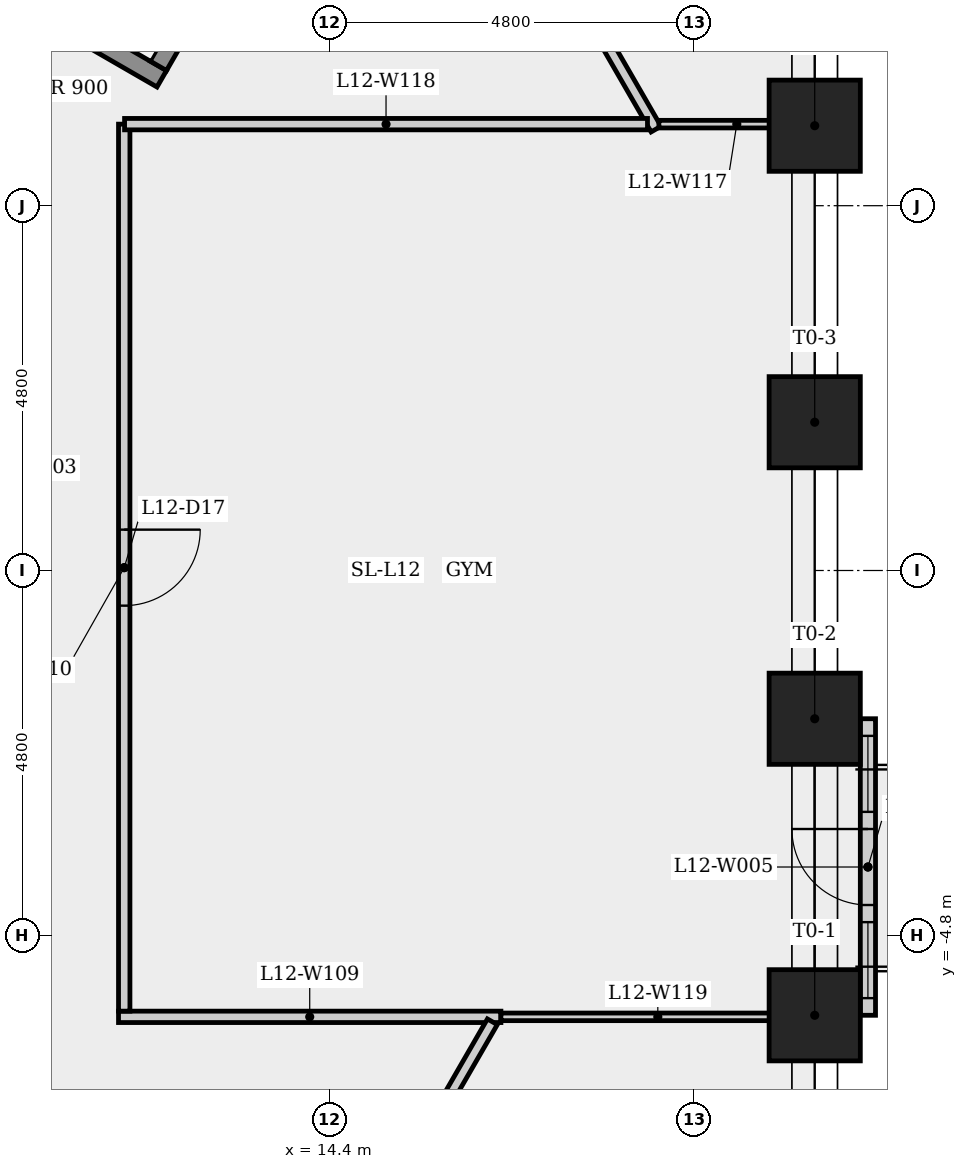
"""IFC4 building model, lengths in metres.
Left out: names, types, materials, properties, quantities, classifications, styles, units other than length and angle.
Written with IfcOpenShell. Run it as: python <this file> out.ifc"""

import sys

from ifc_helpers import new_model, si_unit, direction, frame, frame_2d, origin, origin_2d, place, context, subcontext, project, spatial, rectangle, extrude, element, fill, save


model = new_model("IFC4")
c1 = context("Model", 3, precision=1e-05, world=origin(), true_north=direction((0.0, 1.0)))
c2 = subcontext(c1, "Body", "Model", "MODEL_VIEW")
j1 = project(units=[si_unit("LENGTHUNIT", "METRE"), si_unit("PLANEANGLEUNIT", "RADIAN")], contexts=[c1])
p1 = place(None, origin())
s1 = spatial("IfcSite", under=j1, at=p1, CompositionType="ELEMENT")
p2 = place(p1, origin())
s2 = spatial("IfcBuilding", under=s1, at=p2, CompositionType="ELEMENT")
p3 = place(p2, frame((0.0, 0.0, 49.3)))
s3 = spatial("IfcBuildingStorey", under=s2, at=p3, CompositionType="ELEMENT", Elevation=49.3)
for number, where, z_axis, x_axis in (
    (1, (20.785, -5.852, 0.0), (0.0, 0.0, 1.0), (1.0, 0.0, 0.0)),
    (2, (20.785, -1.951, 0.0), (0.0, 0.0, 1.0), (1.0, 0.0, 0.0)),
    (3, (20.785, 1.951, 0.0), (0.0, 0.0, 1.0), (1.0, 0.0, 0.0)),
    (4, (20.785, 5.852, 0.0), (0.0, 0.0, 1.0), (1.0, 0.0, 0.0)),
):
    element("IfcColumn", number, at=place(p3, frame(where, z_axis=z_axis, x_axis=x_axis)), inside=s3, PredefinedType="COLUMN", context=c2, shape_type="SweptSolid", body=[
        extrude(rectangle(XDim=1.2, YDim=1.2, at=origin_2d()), origin(), (0.0, 0.0, 1.0), 3.4),
    ])
p4 = place(p3, frame((21.485, -5.852, 0.0), z_axis=(0.0, 0.0, 1.0), x_axis=(0.0, 1.0, 0.0)))
e5 = element("IfcWall", 5, at=p4, inside=s3, PredefinedType="SOLIDWALL", context=c2, shape_type="SweptSolid", body=[
    extrude(rectangle(XDim=3.902, YDim=0.2, at=frame_2d((1.951, 0.0))), origin(), (0.0, 0.0, 1.0), 3.4),
])
p5 = place(p4, frame((1.451, 0.0, 0.0)))
e6 = element("IfcOpeningElement", 6, at=p5, cuts=e5, PredefinedType="OPENING", context=c2, shape_type="SweptSolid", body=[
    extrude(rectangle(XDim=1.0, YDim=2.4, at=frame_2d((0.5, 1.2))), frame((0.0, 0.11, 0.0), z_axis=(0.0, -1.0, 0.0), x_axis=(1.0, 0.0, 0.0)), (0.0, 0.0, 1.0), 0.22),
])
p6 = place(p4, frame((0.226, 0.0, 0.9)))
e7 = element("IfcOpeningElement", 7, at=p6, cuts=e5, PredefinedType="OPENING", context=c2, shape_type="SweptSolid", body=[
    extrude(rectangle(XDim=1.0, YDim=1.5, at=frame_2d((0.5, 0.75))), frame((0.0, 0.11, 0.0), z_axis=(0.0, -1.0, 0.0), x_axis=(1.0, 0.0, 0.0)), (0.0, 0.0, 1.0), 0.22),
])
p7 = place(p4, frame((2.677, 0.0, 0.9)))
e8 = element("IfcOpeningElement", 8, at=p7, cuts=e5, PredefinedType="OPENING", context=c2, shape_type="SweptSolid", body=[
    extrude(rectangle(XDim=1.0, YDim=1.5, at=frame_2d((0.5, 0.75))), frame((0.0, 0.11, 0.0), z_axis=(0.0, -1.0, 0.0), x_axis=(1.0, 0.0, 0.0)), (0.0, 0.0, 1.0), 0.22),
])
p8 = place(p3, frame((11.625, -5.873, 0.0), z_axis=(0.0, 0.0, 1.0), x_axis=(1.0, 0.0, 0.0)))
e9 = element("IfcWall", 9, at=p8, inside=s3, PredefinedType="PARTITIONING", context=c2, shape_type="SweptSolid", body=[
    extrude(rectangle(XDim=5.031, YDim=0.15, at=frame_2d((2.516, 0.0))), origin(), (0.0, 0.0, 1.0), 3.05),
])
p9 = place(p3, frame((11.7, 5.873, 0.0), z_axis=(0.0, 0.0, 1.0), x_axis=(0.0, -1.0, 0.0)))
e10 = element("IfcWall", 10, at=p9, inside=s3, PredefinedType="PARTITIONING", context=c2, shape_type="SweptSolid", body=[
    extrude(rectangle(XDim=11.671, YDim=0.15, at=frame_2d((5.835, 0.0))), origin(), (0.0, 0.0, 1.0), 3.05),
])
p10 = place(p9, frame((5.336, 0.0, 0.0)))
e11 = element("IfcOpeningElement", 11, at=p10, cuts=e10, PredefinedType="OPENING", context=c2, shape_type="SweptSolid", body=[
    extrude(rectangle(XDim=1.0, YDim=2.1, at=frame_2d((0.5, 1.05))), frame((0.0, 0.085, 0.0), z_axis=(0.0, -1.0, 0.0), x_axis=(1.0, 0.0, 0.0)), (0.0, 0.0, 1.0), 0.17),
])
p11 = place(p3, frame((12.194, 6.47, 0.0), z_axis=(0.0, 0.0, 1.0), x_axis=(-0.866025499775, 0.499999833739, 0.0)))
e12 = element("IfcWall", 12, at=p11, inside=s3, PredefinedType="SHEAR", context=c2, shape_type="SweptSolid", body=[
    extrude(rectangle(XDim=6.4, YDim=0.25, at=frame_2d((3.2, 0.0))), origin(), (0.0, 0.0, 1.0), 3.05),
])
p12 = place(p11, frame((5.25, 0.0, 0.0)))
e13 = element("IfcOpeningElement", 13, at=p12, cuts=e12, PredefinedType="OPENING", context=c2, shape_type="SweptSolid", body=[
    extrude(rectangle(XDim=1.0, YDim=2.1, at=frame_2d((0.5, 1.05))), frame((0.0, 0.135, 0.0), z_axis=(0.0, -1.0, 0.0), x_axis=(1.0, 0.0, 0.0)), (0.0, 0.0, 1.0), 0.27),
])
p13 = place(p3, frame((13.523, 9.022, 0.0), z_axis=(0.0, 0.0, 1.0), x_axis=(-0.500034990121, -0.866005201286, 0.0)))
e14 = element("IfcWall", 14, at=p13, inside=s3, PredefinedType="SHEAR", context=c2, shape_type="SweptSolid", body=[
    extrude(rectangle(XDim=2.75, YDim=0.25, at=frame_2d((1.375, 0.0))), origin(), (0.0, 0.0, 1.0), 3.05),
])
p14 = place(p3, frame((15.219, 11.831, 0.0), z_axis=(0.0, 0.0, 1.0), x_axis=(0.50002024234, -0.866013716549, 0.0)))
e15 = element("IfcWall", 15, at=p14, inside=s3, PredefinedType="PARTITIONING", context=c2, shape_type="SweptSolid", body=[
    extrude(rectangle(XDim=6.955, YDim=0.15, at=frame_2d((3.478, 0.0))), origin(), (0.0, 0.0, 1.0), 3.05),
])
p15 = place(p14, frame((2.923, 0.0, 0.0)))
e16 = element("IfcOpeningElement", 16, at=p15, cuts=e15, PredefinedType="OPENING", context=c2, shape_type="SweptSolid", body=[
    extrude(rectangle(XDim=1.0, YDim=2.1, at=frame_2d((0.5, 1.05))), frame((0.0, 0.085, 0.0), z_axis=(0.0, -1.0, 0.0), x_axis=(1.0, 0.0, 0.0)), (0.0, 0.0, 1.0), 0.17),
])
p16 = place(p3, frame((16.543, -5.938, 0.0), z_axis=(0.0, 0.0, 1.0), x_axis=(-0.500005424275, -0.866022272055, 0.0)))
e17 = element("IfcWall", 17, at=p16, inside=s3, PredefinedType="PARTITIONING", context=c2, shape_type="SweptSolid", body=[
    extrude(rectangle(XDim=8.19, YDim=0.15, at=frame_2d((4.095, 0.0))), origin(), (0.0, 0.0, 1.0), 3.05),
])
p17 = place(p16, frame((3.595, 0.0, 0.0)))
e18 = element("IfcOpeningElement", 18, at=p17, cuts=e17, PredefinedType="OPENING", context=c2, shape_type="SweptSolid", body=[
    extrude(rectangle(XDim=1.0, YDim=2.1, at=frame_2d((0.5, 1.05))), frame((0.0, 0.085, 0.0), z_axis=(0.0, -1.0, 0.0), x_axis=(1.0, 0.0, 0.0)), (0.0, 0.0, 1.0), 0.17),
])
p18 = place(p3, frame((18.734, 5.873, 0.0), z_axis=(0.0, 0.0, 1.0), x_axis=(1.0, 0.0, 0.0)))
e19 = element("IfcWall", 19, at=p18, inside=s3, PredefinedType="PARTITIONING", context=c2, shape_type="SweptSolid", body=[
    extrude(rectangle(XDim=2.05, YDim=0.1, at=frame_2d((1.025, 0.0))), origin(), (0.0, 0.0, 1.0), 3.05),
])
p19 = place(p3, frame((18.584, 5.873, 0.0), z_axis=(0.0, 0.0, 1.0), x_axis=(-1.0, 0.0, 0.0)))
e20 = element("IfcWall", 20, at=p19, inside=s3, PredefinedType="PARTITIONING", context=c2, shape_type="SweptSolid", body=[
    extrude(rectangle(XDim=6.88, YDim=0.15, at=frame_2d((3.44, 0.0))), origin(), (0.0, 0.0, 1.0), 3.05),
])
p20 = place(p3, frame((20.785, -5.873, 0.0), z_axis=(0.0, 0.0, 1.0), x_axis=(-1.0, 0.0, 0.0)))
e21 = element("IfcWall", 21, at=p20, inside=s3, PredefinedType="PARTITIONING", context=c2, shape_type="SweptSolid", body=[
    extrude(rectangle(XDim=4.129, YDim=0.1, at=frame_2d((2.064, 0.0))), origin(), (0.0, 0.0, 1.0), 3.05),
])
p21 = place(p5, origin())
e22 = element("IfcDoor", 22, at=p21, inside=s3, OperationType="SINGLE_SWING_RIGHT", PredefinedType="DOOR", context=c2, shape_type="SweptSolid", body=[
    extrude(rectangle(XDim=1.0, YDim=2.4, at=frame_2d((0.5, 1.2))), frame((0.0, 0.025, 0.0), z_axis=(0.0, -1.0, 0.0), x_axis=(1.0, 0.0, 0.0)), (0.0, 0.0, 1.0), 0.05),
])
fill(e6, e22)
p22 = place(p6, origin())
e23 = element("IfcWindow", 23, at=p22, inside=s3, PartitioningType="SINGLE_PANEL", PredefinedType="WINDOW", context=c2, shape_type="SweptSolid", body=[
    extrude(rectangle(XDim=1.0, YDim=1.5, at=frame_2d((0.5, 0.75))), frame((0.0, 0.03, 0.0), z_axis=(0.0, -1.0, 0.0), x_axis=(1.0, 0.0, 0.0)), (0.0, 0.0, 1.0), 0.06),
])
fill(e7, e23)
p23 = place(p7, origin())
e24 = element("IfcWindow", 24, at=p23, inside=s3, PartitioningType="SINGLE_PANEL", PredefinedType="WINDOW", context=c2, shape_type="SweptSolid", body=[
    extrude(rectangle(XDim=1.0, YDim=1.5, at=frame_2d((0.5, 0.75))), frame((0.0, 0.03, 0.0), z_axis=(0.0, -1.0, 0.0), x_axis=(1.0, 0.0, 0.0)), (0.0, 0.0, 1.0), 0.06),
])
fill(e8, e24)
p24 = place(p10, origin())
e25 = element("IfcDoor", 25, at=p24, inside=s3, OperationType="SINGLE_SWING_LEFT", PredefinedType="DOOR", context=c2, shape_type="SweptSolid", body=[
    extrude(rectangle(XDim=1.0, YDim=2.1, at=frame_2d((0.5, 1.05))), frame((0.0, 0.025, 0.0), z_axis=(0.0, -1.0, 0.0), x_axis=(1.0, 0.0, 0.0)), (0.0, 0.0, 1.0), 0.05),
])
fill(e11, e25)
save(model, sys.argv[1])
